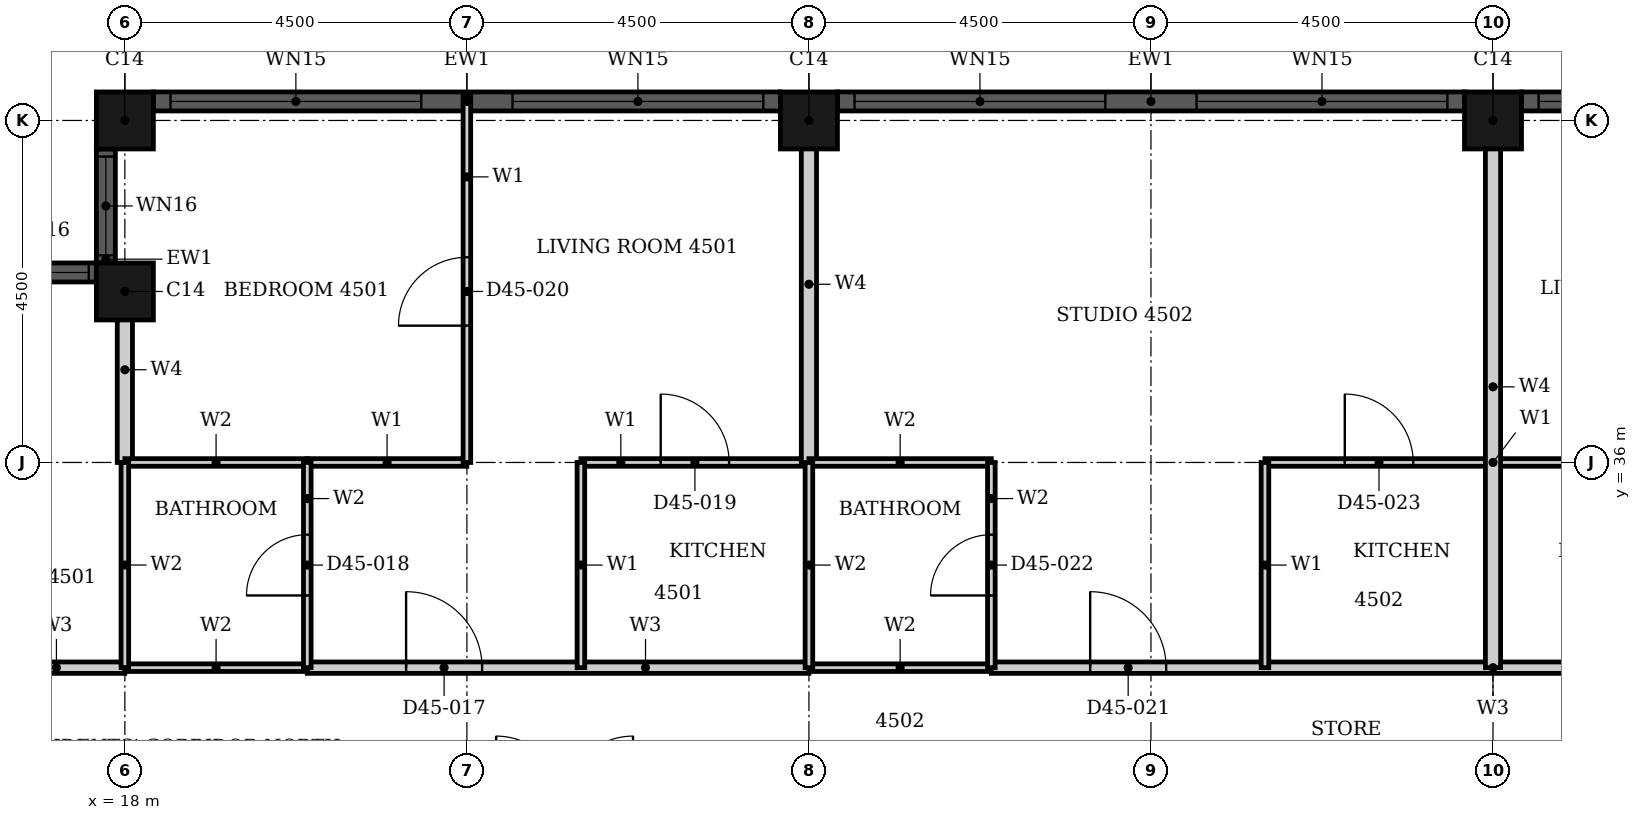
"""IFC4 building model, lengths in metres.
Left out: names, types, materials, properties, quantities, classifications, styles, units other than length and angle.
Written with IfcOpenShell. Run it as: python <this file> out.ifc"""

import sys

from ifc_helpers import new_model, si_unit, direction, frame, frame_2d, origin, origin_2d, place, context, subcontext, project, spatial, rectangle, hollow_rectangle, extrude, element, fill, save


model = new_model("IFC4")
c1 = context("Model", 3, precision=1e-05, world=origin(), true_north=direction((0.0, 1.0)))
c2 = subcontext(c1, "Body", "Model", "MODEL_VIEW")
j1 = project(units=[si_unit("LENGTHUNIT", "METRE"), si_unit("PLANEANGLEUNIT", "RADIAN")], contexts=[c1])
p1 = place(None, origin())
s1 = spatial("IfcSite", under=j1, at=p1, CompositionType="ELEMENT")
p2 = place(p1, origin())
s2 = spatial("IfcBuilding", under=s1, at=p2, CompositionType="ELEMENT")
p3 = place(p2, frame((0.0, 0.0, 180.2)))
s3 = spatial("IfcBuildingStorey", under=s2, at=p3, CompositionType="ELEMENT", Elevation=180.2)
for number, where, z_axis, x_axis in (
    (1, (36.0, 40.5, 0.0), (0.0, 0.0, 1.0), (1.0, 0.0, 0.0)),
    (2, (27.0, 40.5, 0.0), (0.0, 0.0, 1.0), (1.0, 0.0, 0.0)),
    (3, (18.0, 40.5, 0.0), (0.0, 0.0, 1.0), (1.0, 0.0, 0.0)),
    (4, (18.0, 38.25, 0.0), (0.0, 0.0, 1.0), (1.0, 0.0, 0.0)),
):
    element("IfcColumn", number, at=place(p3, frame(where, z_axis=z_axis, x_axis=x_axis)), inside=s3, PredefinedType="COLUMN", context=c2, shape_type="SweptSolid", body=[
        extrude(hollow_rectangle(XDim=0.75, YDim=0.75, WallThickness=0.024, at=origin_2d()), origin(), (0.0, 0.0, 1.0), 3.7),
    ])
p4 = place(p3, frame((44.625, 40.75, 0.0), z_axis=(0.0, 0.0, 1.0), x_axis=(-1.0, 0.0, 0.0)))
e5 = element("IfcWall", 5, at=p4, inside=s3, PredefinedType="SOLIDWALL", context=c2, shape_type="SweptSolid", body=[
    extrude(rectangle(XDim=8.25, YDim=0.25, at=frame_2d((4.125, 0.0))), origin(), (0.0, 0.0, 1.0), 3.7),
])
p5 = place(p4, frame((0.225, 0.0, 0.45)))
e6 = element("IfcOpeningElement", 6, at=p5, cuts=e5, PredefinedType="OPENING", context=c2, shape_type="SweptSolid", body=[
    extrude(rectangle(XDim=3.3, YDim=2.3, at=frame_2d((1.65, 1.15))), frame((0.0, 0.135, 0.0), z_axis=(0.0, -1.0, 0.0), x_axis=(1.0, 0.0, 0.0)), (0.0, 0.0, 1.0), 0.27),
])
p6 = place(p4, frame((4.725, 0.0, 0.45)))
e7 = element("IfcOpeningElement", 7, at=p6, cuts=e5, PredefinedType="OPENING", context=c2, shape_type="SweptSolid", body=[
    extrude(rectangle(XDim=3.3, YDim=2.3, at=frame_2d((1.65, 1.15))), frame((0.0, 0.135, 0.0), z_axis=(0.0, -1.0, 0.0), x_axis=(1.0, 0.0, 0.0)), (0.0, 0.0, 1.0), 0.27),
])
p7 = place(p3, frame((35.625, 40.75, 0.0), z_axis=(0.0, 0.0, 1.0), x_axis=(-1.0, 0.0, 0.0)))
e8 = element("IfcWall", 8, at=p7, inside=s3, PredefinedType="SOLIDWALL", context=c2, shape_type="SweptSolid", body=[
    extrude(rectangle(XDim=8.25, YDim=0.25, at=frame_2d((4.125, 0.0))), origin(), (0.0, 0.0, 1.0), 3.7),
])
p8 = place(p7, frame((0.225, 0.0, 0.45)))
e9 = element("IfcOpeningElement", 9, at=p8, cuts=e8, PredefinedType="OPENING", context=c2, shape_type="SweptSolid", body=[
    extrude(rectangle(XDim=3.3, YDim=2.3, at=frame_2d((1.65, 1.15))), frame((0.0, 0.135, 0.0), z_axis=(0.0, -1.0, 0.0), x_axis=(1.0, 0.0, 0.0)), (0.0, 0.0, 1.0), 0.27),
])
p9 = place(p7, frame((4.725, 0.0, 0.45)))
e10 = element("IfcOpeningElement", 10, at=p9, cuts=e8, PredefinedType="OPENING", context=c2, shape_type="SweptSolid", body=[
    extrude(rectangle(XDim=3.3, YDim=2.3, at=frame_2d((1.65, 1.15))), frame((0.0, 0.135, 0.0), z_axis=(0.0, -1.0, 0.0), x_axis=(1.0, 0.0, 0.0)), (0.0, 0.0, 1.0), 0.27),
])
p10 = place(p3, frame((26.625, 40.75, 0.0), z_axis=(0.0, 0.0, 1.0), x_axis=(-1.0, 0.0, 0.0)))
e11 = element("IfcWall", 11, at=p10, inside=s3, PredefinedType="SOLIDWALL", context=c2, shape_type="SweptSolid", body=[
    extrude(rectangle(XDim=8.25, YDim=0.25, at=frame_2d((4.125, 0.0))), origin(), (0.0, 0.0, 1.0), 3.7),
])
p11 = place(p10, frame((0.225, 0.0, 0.45)))
e12 = element("IfcOpeningElement", 12, at=p11, cuts=e11, PredefinedType="OPENING", context=c2, shape_type="SweptSolid", body=[
    extrude(rectangle(XDim=3.3, YDim=2.3, at=frame_2d((1.65, 1.15))), frame((0.0, 0.135, 0.0), z_axis=(0.0, -1.0, 0.0), x_axis=(1.0, 0.0, 0.0)), (0.0, 0.0, 1.0), 0.27),
])
p12 = place(p10, frame((4.725, 0.0, 0.45)))
e13 = element("IfcOpeningElement", 13, at=p12, cuts=e11, PredefinedType="OPENING", context=c2, shape_type="SweptSolid", body=[
    extrude(rectangle(XDim=3.3, YDim=2.3, at=frame_2d((1.65, 1.15))), frame((0.0, 0.135, 0.0), z_axis=(0.0, -1.0, 0.0), x_axis=(1.0, 0.0, 0.0)), (0.0, 0.0, 1.0), 0.27),
])
p13 = place(p3, frame((17.75, 40.125, 0.0), z_axis=(0.0, 0.0, 1.0), x_axis=(0.0, -1.0, 0.0)))
e14 = element("IfcWall", 14, at=p13, inside=s3, PredefinedType="SOLIDWALL", context=c2, shape_type="SweptSolid", body=[
    extrude(rectangle(XDim=1.5, YDim=0.25, at=frame_2d((0.75, 0.0))), origin(), (0.0, 0.0, 1.0), 3.7),
])
p14 = place(p13, frame((0.1, 0.0, 0.9)))
e15 = element("IfcOpeningElement", 15, at=p14, cuts=e14, PredefinedType="OPENING", context=c2, shape_type="SweptSolid", body=[
    extrude(rectangle(XDim=1.3, YDim=1.85, at=frame_2d((0.65, 0.925))), frame((0.0, 0.135, 0.0), z_axis=(0.0, -1.0, 0.0), x_axis=(1.0, 0.0, 0.0)), (0.0, 0.0, 1.0), 0.27),
])
p15 = place(p3, frame((17.625, 38.5, 0.0), z_axis=(0.0, 0.0, 1.0), x_axis=(-1.0, 0.0, 0.0)))
e16 = element("IfcWall", 16, at=p15, inside=s3, PredefinedType="SOLIDWALL", context=c2, shape_type="SweptSolid", body=[
    extrude(rectangle(XDim=1.5, YDim=0.25, at=frame_2d((0.75, 0.0))), origin(), (0.0, 0.0, 1.0), 3.7),
])
p16 = place(p15, frame((0.1, 0.0, 0.9)))
e17 = element("IfcOpeningElement", 17, at=p16, cuts=e16, PredefinedType="OPENING", context=c2, shape_type="SweptSolid", body=[
    extrude(rectangle(XDim=1.3, YDim=1.85, at=frame_2d((0.65, 0.925))), frame((0.0, 0.135, 0.0), z_axis=(0.0, -1.0, 0.0), x_axis=(1.0, 0.0, 0.0)), (0.0, 0.0, 1.0), 0.27),
])
p17 = place(p3, frame((20.4, 33.3, 0.0), z_axis=(0.0, 0.0, 1.0), x_axis=(1.0, 0.0, 0.0)))
e18 = element("IfcWall", 18, at=p17, inside=s3, PredefinedType="PARTITIONING", context=c2, shape_type="SweptSolid", body=[
    extrude(rectangle(XDim=6.6, YDim=0.15, at=frame_2d((3.3, 0.0))), origin(), (0.0, 0.0, 1.0), 3.4),
])
p18 = place(p17, frame((1.3, 0.0, 0.0)))
e19 = element("IfcOpeningElement", 19, at=p18, cuts=e18, PredefinedType="OPENING", context=c2, shape_type="SweptSolid", body=[
    extrude(rectangle(XDim=1.0, YDim=2.2, at=frame_2d((0.5, 1.1))), frame((0.0, 0.085, 0.0), z_axis=(0.0, -1.0, 0.0), x_axis=(1.0, 0.0, 0.0)), (0.0, 0.0, 1.0), 0.17),
])
p19 = place(p3, frame((29.4, 33.3, 0.0), z_axis=(0.0, 0.0, 1.0), x_axis=(1.0, 0.0, 0.0)))
e20 = element("IfcWall", 20, at=p19, inside=s3, PredefinedType="PARTITIONING", context=c2, shape_type="SweptSolid", body=[
    extrude(rectangle(XDim=13.2, YDim=0.15, at=frame_2d((6.6, 0.0))), origin(), (0.0, 0.0, 1.0), 3.4),
])
p20 = place(p19, frame((1.3, 0.0, 0.0)))
e21 = element("IfcOpeningElement", 21, at=p20, cuts=e20, PredefinedType="OPENING", context=c2, shape_type="SweptSolid", body=[
    extrude(rectangle(XDim=1.0, YDim=2.2, at=frame_2d((0.5, 1.1))), frame((0.0, 0.085, 0.0), z_axis=(0.0, -1.0, 0.0), x_axis=(1.0, 0.0, 0.0)), (0.0, 0.0, 1.0), 0.17),
])
p21 = place(p19, frame((10.9, 0.0, 0.0)))
e22 = element("IfcOpeningElement", 22, at=p21, cuts=e20, PredefinedType="OPENING", context=c2, shape_type="SweptSolid", body=[
    extrude(rectangle(XDim=1.0, YDim=2.2, at=frame_2d((0.5, 1.1))), frame((0.0, 0.085, 0.0), z_axis=(0.0, -1.0, 0.0), x_axis=(1.0, 0.0, 0.0)), (0.0, 0.0, 1.0), 0.17),
])
p22 = place(p3, frame((16.2, 33.3, 0.0), z_axis=(0.0, 0.0, 1.0), x_axis=(1.0, 0.0, 0.0)))
e23 = element("IfcWall", 23, at=p22, inside=s3, PredefinedType="PARTITIONING", context=c2, shape_type="SweptSolid", body=[
    extrude(rectangle(XDim=1.799, YDim=0.15, at=frame_2d((0.899, 0.0))), origin(), (0.0, 0.0, 1.0), 3.4),
])
p23 = place(p3, frame((20.4, 36.0, 0.0), z_axis=(0.0, 0.0, 1.0), x_axis=(1.0, 0.0, 0.0)))
e24 = element("IfcWall", 24, at=p23, inside=s3, PredefinedType="PARTITIONING", context=c2, shape_type="SweptSolid", body=[
    extrude(rectangle(XDim=2.1, YDim=0.1, at=frame_2d((1.05, 0.0))), origin(), (0.0, 0.0, 1.0), 3.4),
])
p24 = place(p3, frame((24.0, 36.0, 0.0), z_axis=(0.0, 0.0, 1.0), x_axis=(1.0, 0.0, 0.0)))
e25 = element("IfcWall", 25, at=p24, inside=s3, PredefinedType="PARTITIONING", context=c2, shape_type="SweptSolid", body=[
    extrude(rectangle(XDim=3.0, YDim=0.1, at=frame_2d((1.5, 0.0))), origin(), (0.0, 0.0, 1.0), 3.4),
])
p25 = place(p24, frame((1.05, 0.0, 0.0)))
e26 = element("IfcOpeningElement", 26, at=p25, cuts=e25, PredefinedType="OPENING", context=c2, shape_type="SweptSolid", body=[
    extrude(rectangle(XDim=0.9, YDim=2.1, at=frame_2d((0.45, 1.05))), frame((0.0, 0.06, 0.0), z_axis=(0.0, -1.0, 0.0), x_axis=(1.0, 0.0, 0.0)), (0.0, 0.0, 1.0), 0.12),
])
p26 = place(p3, frame((33.0, 36.0, 0.0), z_axis=(0.0, 0.0, 1.0), x_axis=(1.0, 0.0, 0.0)))
e27 = element("IfcWall", 27, at=p26, inside=s3, PredefinedType="PARTITIONING", context=c2, shape_type="SweptSolid", body=[
    extrude(rectangle(XDim=6.0, YDim=0.1, at=frame_2d((3.0, 0.0))), origin(), (0.0, 0.0, 1.0), 3.4),
])
p27 = place(p26, frame((1.05, 0.0, 0.0)))
e28 = element("IfcOpeningElement", 28, at=p27, cuts=e27, PredefinedType="OPENING", context=c2, shape_type="SweptSolid", body=[
    extrude(rectangle(XDim=0.9, YDim=2.1, at=frame_2d((0.45, 1.05))), frame((0.0, 0.06, 0.0), z_axis=(0.0, -1.0, 0.0), x_axis=(1.0, 0.0, 0.0)), (0.0, 0.0, 1.0), 0.12),
])
p28 = place(p26, frame((4.05, 0.0, 0.0)))
e29 = element("IfcOpeningElement", 29, at=p28, cuts=e27, PredefinedType="OPENING", context=c2, shape_type="SweptSolid", body=[
    extrude(rectangle(XDim=0.9, YDim=2.1, at=frame_2d((0.45, 1.05))), frame((0.0, 0.06, 0.0), z_axis=(0.0, -1.0, 0.0), x_axis=(1.0, 0.0, 0.0)), (0.0, 0.0, 1.0), 0.12),
])
p29 = place(p3, frame((22.5, 36.0, 0.0), z_axis=(0.0, 0.0, 1.0), x_axis=(0.0, 1.0, 0.0)))
e30 = element("IfcWall", 30, at=p29, inside=s3, PredefinedType="PARTITIONING", context=c2, shape_type="SweptSolid", body=[
    extrude(rectangle(XDim=4.815, YDim=0.1, at=frame_2d((2.407, 0.0))), origin(), (0.0, 0.0, 1.0), 3.4),
])
p30 = place(p29, frame((1.8, 0.0, 0.0)))
e31 = element("IfcOpeningElement", 31, at=p30, cuts=e30, PredefinedType="OPENING", context=c2, shape_type="SweptSolid", body=[
    extrude(rectangle(XDim=0.9, YDim=2.1, at=frame_2d((0.45, 1.05))), frame((0.0, 0.06, 0.0), z_axis=(0.0, -1.0, 0.0), x_axis=(1.0, 0.0, 0.0)), (0.0, 0.0, 1.0), 0.12),
])
for number, where, z_axis, x_axis in (
    (32, (24.0, 33.3, 0.0), (0.0, 0.0, 1.0), (0.0, 1.0, 0.0)),
    (33, (33.0, 33.3, 0.0), (0.0, 0.0, 1.0), (0.0, 1.0, 0.0)),
):
    element("IfcWall", number, at=place(p3, frame(where, z_axis=z_axis, x_axis=x_axis)), inside=s3, PredefinedType="PARTITIONING", context=c2, shape_type="SweptSolid", body=[
        extrude(rectangle(XDim=2.7, YDim=0.1, at=frame_2d((1.35, 0.0))), origin(), (0.0, 0.0, 1.0), 3.4),
    ])
p31 = place(p3, frame((18.0, 36.0, 0.0), z_axis=(0.0, 0.0, 1.0), x_axis=(0.0, 1.0, 0.0)))
e34 = element("IfcWall", 34, at=p31, inside=s3, PredefinedType="PARTITIONING", context=c2, shape_type="SweptSolid", body=[
    extrude(rectangle(XDim=2.44, YDim=0.2, at=frame_2d((1.22, 0.0))), origin(), (0.0, 0.0, 1.0), 3.4),
])
p32 = place(p3, frame((27.0, 36.0, 0.0), z_axis=(0.0, 0.0, 1.0), x_axis=(0.0, 1.0, 0.0)))
e35 = element("IfcWall", 35, at=p32, inside=s3, PredefinedType="PARTITIONING", context=c2, shape_type="SweptSolid", body=[
    extrude(rectangle(XDim=4.69, YDim=0.2, at=frame_2d((2.345, 0.0))), origin(), (0.0, 0.0, 1.0), 3.4),
])
p33 = place(p3, frame((36.0, 33.3, 0.0), z_axis=(0.0, 0.0, 1.0), x_axis=(0.0, 1.0, 0.0)))
e36 = element("IfcWall", 36, at=p33, inside=s3, PredefinedType="PARTITIONING", context=c2, shape_type="SweptSolid", body=[
    extrude(rectangle(XDim=7.39, YDim=0.2, at=frame_2d((3.695, 0.0))), origin(), (0.0, 0.0, 1.0), 3.4),
])
for number, where, z_axis, x_axis in (
    (37, (18.0, 33.3, 0.0), (0.0, 0.0, 1.0), (1.0, 0.0, 0.0)),
    (38, (27.0, 33.3, 0.0), (0.0, 0.0, 1.0), (1.0, 0.0, 0.0)),
    (39, (18.0, 36.0, 0.0), (0.0, 0.0, 1.0), (1.0, 0.0, 0.0)),
    (40, (27.0, 36.0, 0.0), (0.0, 0.0, 1.0), (1.0, 0.0, 0.0)),
):
    element("IfcWall", number, at=place(p3, frame(where, z_axis=z_axis, x_axis=x_axis)), inside=s3, PredefinedType="PARTITIONING", context=c2, shape_type="SweptSolid", body=[
        extrude(rectangle(XDim=2.4, YDim=0.1, at=frame_2d((1.2, 0.0))), origin(), (0.0, 0.0, 1.0), 3.4),
    ])
p34 = place(p3, frame((18.0, 33.301, 0.0), z_axis=(0.0, 0.0, 1.0), x_axis=(0.0, 1.0, 0.0)))
e41 = element("IfcWall", 41, at=p34, inside=s3, PredefinedType="PARTITIONING", context=c2, shape_type="SweptSolid", body=[
    extrude(rectangle(XDim=2.699, YDim=0.1, at=frame_2d((1.35, 0.0))), origin(), (0.0, 0.0, 1.0), 3.4),
])
p35 = place(p3, frame((20.4, 33.3, 0.0), z_axis=(0.0, 0.0, 1.0), x_axis=(0.0, 1.0, 0.0)))
e42 = element("IfcWall", 42, at=p35, inside=s3, PredefinedType="PARTITIONING", context=c2, shape_type="SweptSolid", body=[
    extrude(rectangle(XDim=2.7, YDim=0.1, at=frame_2d((1.35, 0.0))), origin(), (0.0, 0.0, 1.0), 3.4),
])
p36 = place(p35, frame((0.95, 0.0, 0.0)))
e43 = element("IfcOpeningElement", 43, at=p36, cuts=e42, PredefinedType="OPENING", context=c2, shape_type="SweptSolid", body=[
    extrude(rectangle(XDim=0.8, YDim=2.1, at=frame_2d((0.4, 1.05))), frame((0.0, 0.06, 0.0), z_axis=(0.0, -1.0, 0.0), x_axis=(1.0, 0.0, 0.0)), (0.0, 0.0, 1.0), 0.12),
])
p37 = place(p3, frame((27.0, 33.3, 0.0), z_axis=(0.0, 0.0, 1.0), x_axis=(0.0, 1.0, 0.0)))
e44 = element("IfcWall", 44, at=p37, inside=s3, PredefinedType="PARTITIONING", context=c2, shape_type="SweptSolid", body=[
    extrude(rectangle(XDim=2.7, YDim=0.1, at=frame_2d((1.35, 0.0))), origin(), (0.0, 0.0, 1.0), 3.4),
])
p38 = place(p3, frame((29.4, 33.3, 0.0), z_axis=(0.0, 0.0, 1.0), x_axis=(0.0, 1.0, 0.0)))
e45 = element("IfcWall", 45, at=p38, inside=s3, PredefinedType="PARTITIONING", context=c2, shape_type="SweptSolid", body=[
    extrude(rectangle(XDim=2.7, YDim=0.1, at=frame_2d((1.35, 0.0))), origin(), (0.0, 0.0, 1.0), 3.4),
])
p39 = place(p38, frame((0.95, 0.0, 0.0)))
e46 = element("IfcOpeningElement", 46, at=p39, cuts=e45, PredefinedType="OPENING", context=c2, shape_type="SweptSolid", body=[
    extrude(rectangle(XDim=0.8, YDim=2.1, at=frame_2d((0.4, 1.05))), frame((0.0, 0.06, 0.0), z_axis=(0.0, -1.0, 0.0), x_axis=(1.0, 0.0, 0.0)), (0.0, 0.0, 1.0), 0.12),
])
p40 = place(p6, origin())
e47 = element("IfcWindow", 47, at=p40, inside=s3, PartitioningType="SINGLE_PANEL", PredefinedType="WINDOW", context=c2, shape_type="SweptSolid", body=[
    extrude(rectangle(XDim=3.3, YDim=2.3, at=frame_2d((1.65, 1.15))), frame((0.0, 0.03, 0.0), z_axis=(0.0, -1.0, 0.0), x_axis=(1.0, 0.0, 0.0)), (0.0, 0.0, 1.0), 0.06),
])
fill(e7, e47)
p41 = place(p8, origin())
e48 = element("IfcWindow", 48, at=p41, inside=s3, PartitioningType="SINGLE_PANEL", PredefinedType="WINDOW", context=c2, shape_type="SweptSolid", body=[
    extrude(rectangle(XDim=3.3, YDim=2.3, at=frame_2d((1.65, 1.15))), frame((0.0, 0.03, 0.0), z_axis=(0.0, -1.0, 0.0), x_axis=(1.0, 0.0, 0.0)), (0.0, 0.0, 1.0), 0.06),
])
fill(e9, e48)
p42 = place(p9, origin())
e49 = element("IfcWindow", 49, at=p42, inside=s3, PartitioningType="SINGLE_PANEL", PredefinedType="WINDOW", context=c2, shape_type="SweptSolid", body=[
    extrude(rectangle(XDim=3.3, YDim=2.3, at=frame_2d((1.65, 1.15))), frame((0.0, 0.03, 0.0), z_axis=(0.0, -1.0, 0.0), x_axis=(1.0, 0.0, 0.0)), (0.0, 0.0, 1.0), 0.06),
])
fill(e10, e49)
p43 = place(p11, origin())
e50 = element("IfcWindow", 50, at=p43, inside=s3, PartitioningType="SINGLE_PANEL", PredefinedType="WINDOW", context=c2, shape_type="SweptSolid", body=[
    extrude(rectangle(XDim=3.3, YDim=2.3, at=frame_2d((1.65, 1.15))), frame((0.0, 0.03, 0.0), z_axis=(0.0, -1.0, 0.0), x_axis=(1.0, 0.0, 0.0)), (0.0, 0.0, 1.0), 0.06),
])
fill(e12, e50)
p44 = place(p12, origin())
e51 = element("IfcWindow", 51, at=p44, inside=s3, PartitioningType="SINGLE_PANEL", PredefinedType="WINDOW", context=c2, shape_type="SweptSolid", body=[
    extrude(rectangle(XDim=3.3, YDim=2.3, at=frame_2d((1.65, 1.15))), frame((0.0, 0.03, 0.0), z_axis=(0.0, -1.0, 0.0), x_axis=(1.0, 0.0, 0.0)), (0.0, 0.0, 1.0), 0.06),
])
fill(e13, e51)
p45 = place(p14, origin())
e52 = element("IfcWindow", 52, at=p45, inside=s3, PartitioningType="SINGLE_PANEL", PredefinedType="WINDOW", context=c2, shape_type="SweptSolid", body=[
    extrude(rectangle(XDim=1.3, YDim=1.85, at=frame_2d((0.65, 0.925))), frame((0.0, 0.03, 0.0), z_axis=(0.0, -1.0, 0.0), x_axis=(1.0, 0.0, 0.0)), (0.0, 0.0, 1.0), 0.06),
])
fill(e15, e52)
p46 = place(p16, origin())
e53 = element("IfcWindow", 53, at=p46, inside=s3, PartitioningType="SINGLE_PANEL", PredefinedType="WINDOW", context=c2, shape_type="SweptSolid", body=[
    extrude(rectangle(XDim=1.3, YDim=1.85, at=frame_2d((0.65, 0.925))), frame((0.0, 0.03, 0.0), z_axis=(0.0, -1.0, 0.0), x_axis=(1.0, 0.0, 0.0)), (0.0, 0.0, 1.0), 0.06),
])
fill(e17, e53)
p47 = place(p18, origin())
e54 = element("IfcDoor", 54, at=p47, inside=s3, OperationType="SINGLE_SWING_RIGHT", PredefinedType="DOOR", context=c2, shape_type="SweptSolid", body=[
    extrude(rectangle(XDim=1.0, YDim=2.2, at=frame_2d((0.5, 1.1))), frame((0.0, 0.025, 0.0), z_axis=(0.0, -1.0, 0.0), x_axis=(1.0, 0.0, 0.0)), (0.0, 0.0, 1.0), 0.05),
])
fill(e19, e54)
p48 = place(p36, origin())
e55 = element("IfcDoor", 55, at=p48, inside=s3, OperationType="SINGLE_SWING_LEFT", PredefinedType="DOOR", context=c2, shape_type="SweptSolid", body=[
    extrude(rectangle(XDim=0.8, YDim=2.1, at=frame_2d((0.4, 1.05))), frame((0.0, 0.025, 0.0), z_axis=(0.0, -1.0, 0.0), x_axis=(1.0, 0.0, 0.0)), (0.0, 0.0, 1.0), 0.05),
])
fill(e43, e55)
p49 = place(p25, origin())
e56 = element("IfcDoor", 56, at=p49, inside=s3, OperationType="SINGLE_SWING_LEFT", PredefinedType="DOOR", context=c2, shape_type="SweptSolid", body=[
    extrude(rectangle(XDim=0.9, YDim=2.1, at=frame_2d((0.45, 1.05))), frame((0.0, 0.025, 0.0), z_axis=(0.0, -1.0, 0.0), x_axis=(1.0, 0.0, 0.0)), (0.0, 0.0, 1.0), 0.05),
])
fill(e26, e56)
p50 = place(p30, origin())
e57 = element("IfcDoor", 57, at=p50, inside=s3, OperationType="SINGLE_SWING_LEFT", PredefinedType="DOOR", context=c2, shape_type="SweptSolid", body=[
    extrude(rectangle(XDim=0.9, YDim=2.1, at=frame_2d((0.45, 1.05))), frame((0.0, 0.025, 0.0), z_axis=(0.0, -1.0, 0.0), x_axis=(1.0, 0.0, 0.0)), (0.0, 0.0, 1.0), 0.05),
])
fill(e31, e57)
p51 = place(p20, origin())
e58 = element("IfcDoor", 58, at=p51, inside=s3, OperationType="SINGLE_SWING_LEFT", PredefinedType="DOOR", context=c2, shape_type="SweptSolid", body=[
    extrude(rectangle(XDim=1.0, YDim=2.2, at=frame_2d((0.5, 1.1))), frame((0.0, 0.025, 0.0), z_axis=(0.0, -1.0, 0.0), x_axis=(1.0, 0.0, 0.0)), (0.0, 0.0, 1.0), 0.05),
])
fill(e21, e58)
p52 = place(p39, origin())
e59 = element("IfcDoor", 59, at=p52, inside=s3, OperationType="SINGLE_SWING_RIGHT", PredefinedType="DOOR", context=c2, shape_type="SweptSolid", body=[
    extrude(rectangle(XDim=0.8, YDim=2.1, at=frame_2d((0.4, 1.05))), frame((0.0, 0.025, 0.0), z_axis=(0.0, -1.0, 0.0), x_axis=(1.0, 0.0, 0.0)), (0.0, 0.0, 1.0), 0.05),
])
fill(e46, e59)
p53 = place(p27, origin())
e60 = element("IfcDoor", 60, at=p53, inside=s3, OperationType="SINGLE_SWING_LEFT", PredefinedType="DOOR", context=c2, shape_type="SweptSolid", body=[
    extrude(rectangle(XDim=0.9, YDim=2.1, at=frame_2d((0.45, 1.05))), frame((0.0, 0.025, 0.0), z_axis=(0.0, -1.0, 0.0), x_axis=(1.0, 0.0, 0.0)), (0.0, 0.0, 1.0), 0.05),
])
fill(e28, e60)
save(model, sys.argv[1])
